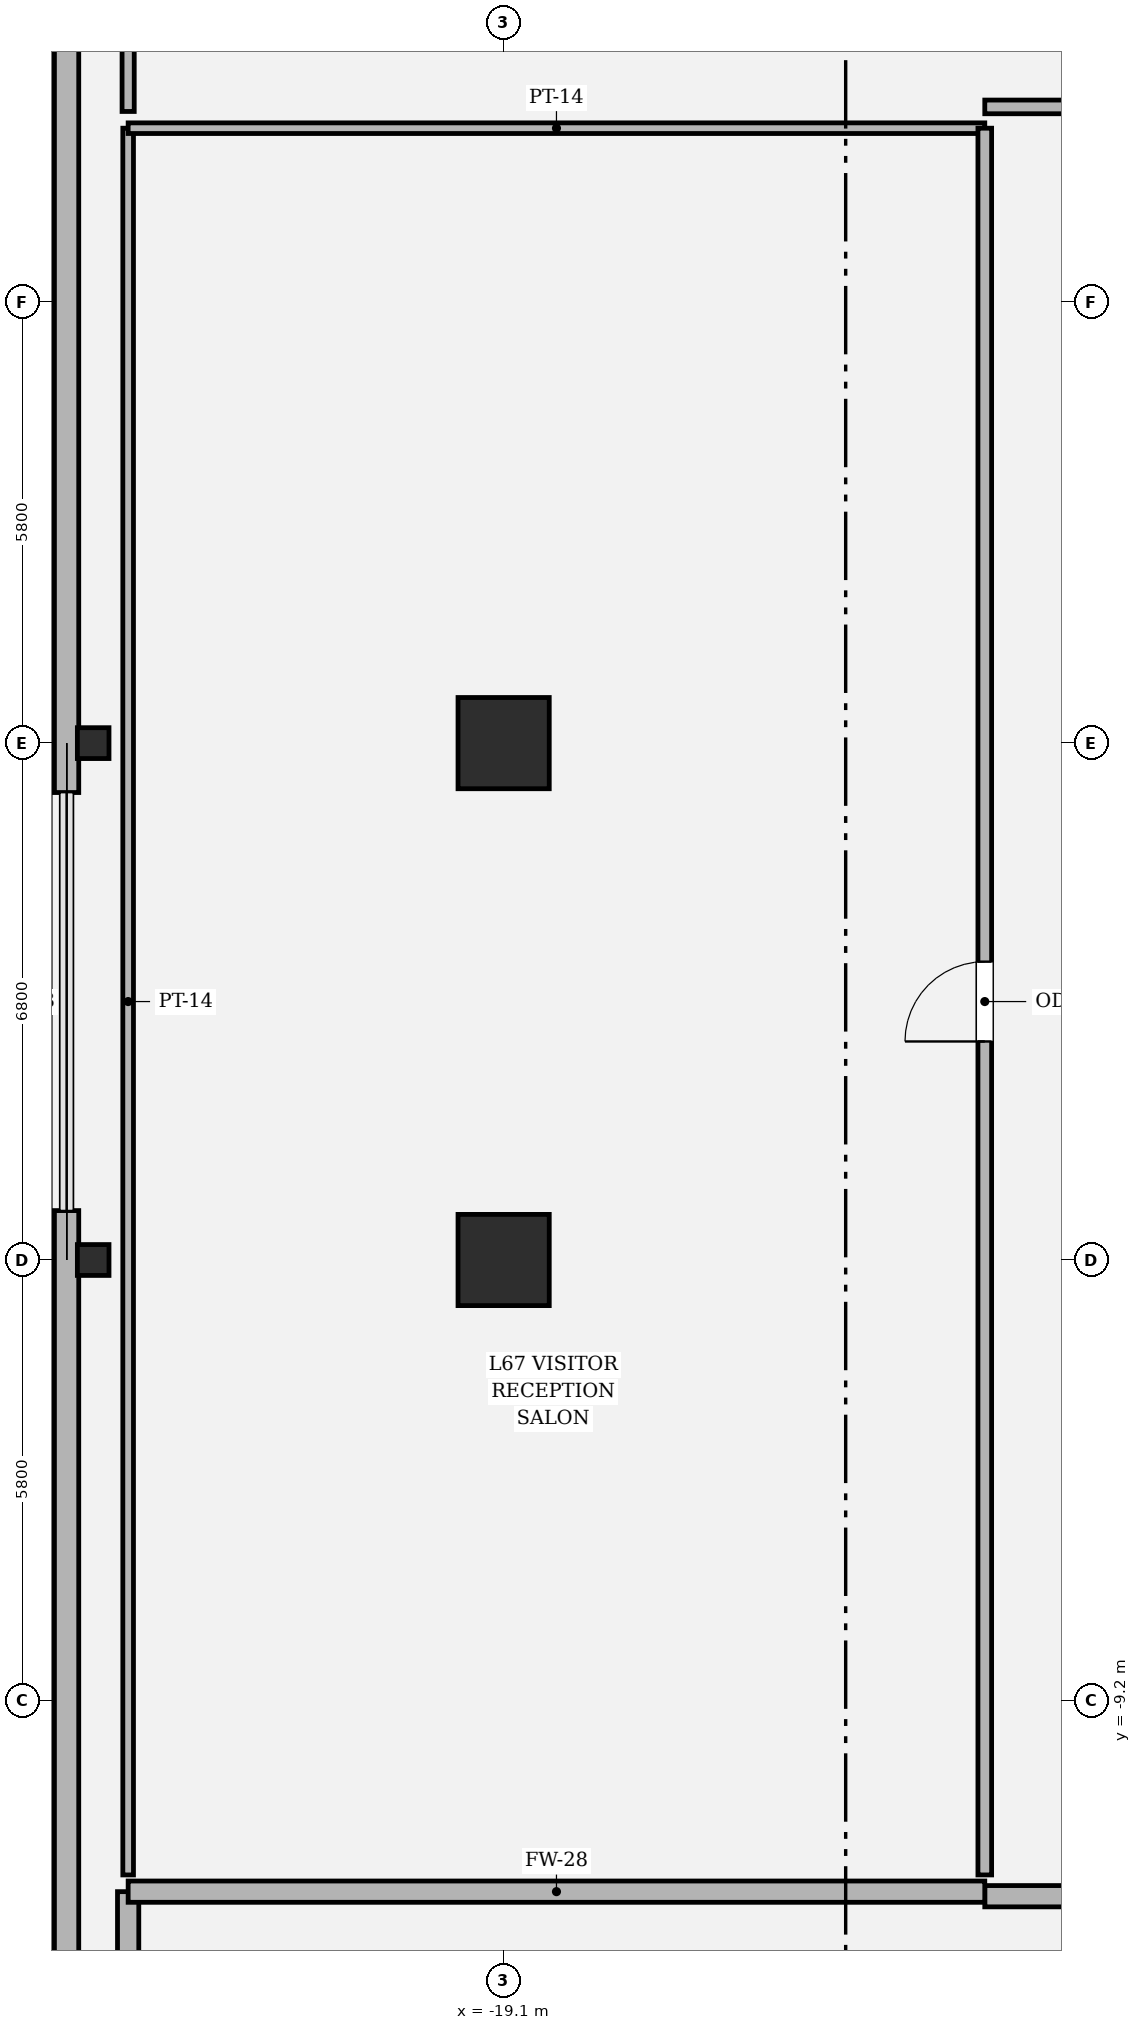
"""IFC4 building model, lengths in metres.
Left out: names, types, materials, properties, quantities, classifications, styles, units other than length and angle.
Written with IfcOpenShell. Run it as: python <this file> out.ifc"""

import sys

from ifc_helpers import new_model, si_unit, direction, frame, frame_2d, origin, origin_2d, place, context, subcontext, project, spatial, rectangle, hollow_rectangle, i_section, extrude, element, fill, save


model = new_model("IFC4")
c1 = context("Model", 3, precision=1e-05, world=origin(), true_north=direction((0.0, 1.0)))
c2 = subcontext(c1, "Body", "Model", "MODEL_VIEW")
j1 = project(units=[si_unit("LENGTHUNIT", "METRE"), si_unit("PLANEANGLEUNIT", "RADIAN")], contexts=[c1])
p1 = place(None, origin())
s1 = spatial("IfcSite", under=j1, at=p1, CompositionType="ELEMENT")
p2 = place(p1, origin())
s2 = spatial("IfcBuilding", under=s1, at=p2, CompositionType="ELEMENT")
p3 = place(p2, frame((0.0, 0.0, 283.8)))
s3 = spatial("IfcBuildingStorey", under=s2, at=p3, CompositionType="ELEMENT", Elevation=283.8)
for number, where, z_axis, x_axis in (
    (1, (-19.1, 3.4, 0.0), (0.0, 0.0, 1.0), (1.0, 0.0, 0.0)),
    (2, (-19.1, -3.4, 0.0), (0.0, 0.0, 1.0), (1.0, 0.0, 0.0)),
):
    element("IfcColumn", number, at=place(p3, frame(where, z_axis=z_axis, x_axis=x_axis)), inside=s3, PredefinedType="COLUMN", context=c2, shape_type="SweptSolid", body=[
        extrude(hollow_rectangle(XDim=1.2, YDim=1.2, WallThickness=0.035, at=origin_2d()), origin(), (0.0, 0.0, 1.0), 4.2),
    ])
for number, where, z_axis, x_axis in (
    (3, (-24.5, -3.4, 0.0), (0.0, 0.0, 1.0), (0.0, 1.0, 0.0)),
    (4, (-24.5, 3.4, 0.0), (0.0, 0.0, 1.0), (0.0, 1.0, 0.0)),
):
    element("IfcColumn", number, at=place(p3, frame(where, z_axis=z_axis, x_axis=x_axis)), inside=s3, PredefinedType="COLUMN", context=c2, shape_type="SweptSolid", body=[
        extrude(i_section(OverallWidth=0.406, OverallDepth=0.416, WebThickness=0.029, FlangeThickness=0.048, FilletRadius=0.018, at=origin_2d()), origin(), (0.0, 0.0, 1.0), 4.198),
    ])
p4 = place(p3, frame((-24.85, 20.237, 0.0), z_axis=(0.0, 0.0, 1.0), x_axis=(0.0, -1.0, 0.0)))
e5 = element("IfcWall", 5, at=p4, inside=s3, PredefinedType="SOLIDWALL", context=c2, shape_type="SweptSolid", body=[
    extrude(rectangle(XDim=17.487, YDim=0.32, at=frame_2d((8.743, 0.0))), origin(), (0.0, 0.0, 1.0), 2.714),
])
p5 = place(p3, frame((-24.85, -2.75, 0.0), z_axis=(0.0, 0.0, 1.0), x_axis=(0.0, -1.0, 0.0)))
e6 = element("IfcWall", 6, at=p5, inside=s3, PredefinedType="SOLIDWALL", context=c2, shape_type="SweptSolid", body=[
    extrude(rectangle(XDim=12.687, YDim=0.32, at=frame_2d((6.344, 0.0))), origin(), (0.0, 0.0, 1.0), 2.714),
])
p6 = place(p3, frame((-12.77, -11.77, 0.0), z_axis=(0.0, 0.0, 1.0), x_axis=(1.0, 0.0, 0.0)))
e7 = element("IfcWall", 7, at=p6, inside=s3, PredefinedType="SOLIDWALL", context=c2, shape_type="SweptSolid", body=[
    extrude(rectangle(XDim=17.718, YDim=0.28, at=frame_2d((8.859, 0.0))), origin(), (0.0, 0.0, 1.0), 3.394),
])
p7 = place(p6, frame((8.009, 0.0, 0.0)))
e8 = element("IfcOpeningElement", 8, at=p7, cuts=e7, PredefinedType="OPENING", context=c2, shape_type="SweptSolid", body=[
    extrude(rectangle(XDim=1.7, YDim=2.3, at=frame_2d((0.85, 1.15))), frame((0.0, 0.15, 0.0), z_axis=(0.0, -1.0, 0.0), x_axis=(1.0, 0.0, 0.0)), (0.0, 0.0, 1.0), 0.3),
])
p8 = place(p3, frame((-24.04, -16.54, 0.0), z_axis=(0.0, 0.0, 1.0), x_axis=(0.0, 1.0, 0.0)))
e9 = element("IfcWall", 9, at=p8, inside=s3, PredefinedType="SOLIDWALL", context=c2, shape_type="SweptSolid", body=[
    extrude(rectangle(XDim=4.83, YDim=0.28, at=frame_2d((2.415, 0.0))), origin(), (0.0, 0.0, 1.0), 4.0),
])
p9 = place(p3, frame((-24.04, -11.71, 0.0), z_axis=(0.0, 0.0, 1.0), x_axis=(1.0, 0.0, 0.0)))
e10 = element("IfcWall", 10, at=p9, inside=s3, PredefinedType="SOLIDWALL", context=c2, shape_type="SweptSolid", body=[
    extrude(rectangle(XDim=11.27, YDim=0.28, at=frame_2d((5.635, 0.0))), origin(), (0.0, 0.0, 1.0), 3.394),
])
p10 = place(p3, frame((-24.04, -11.49, 0.0), z_axis=(0.0, 0.0, 1.0), x_axis=(0.0, 1.0, 0.0)))
e11 = element("IfcWall", 11, at=p10, inside=s3, PredefinedType="PARTITIONING", context=c2, shape_type="SweptSolid", body=[
    extrude(rectangle(XDim=22.98, YDim=0.14, at=frame_2d((11.49, 0.0))), origin(), (0.0, 0.0, 1.0), 2.674),
])
p11 = place(p3, frame((-24.04, 11.49, 0.0), z_axis=(0.0, 0.0, 1.0), x_axis=(1.0, 0.0, 0.0)))
e12 = element("IfcWall", 12, at=p11, inside=s3, PredefinedType="PARTITIONING", context=c2, shape_type="SweptSolid", body=[
    extrude(rectangle(XDim=11.27, YDim=0.14, at=frame_2d((5.635, 0.0))), origin(), (0.0, 0.0, 1.0), 3.394),
])
p12 = place(p3, frame((-12.77, 11.49, 0.0), z_axis=(0.0, 0.0, 1.0), x_axis=(0.0, -1.0, 0.0)))
e13 = element("IfcWall", 13, at=p12, inside=s3, PredefinedType="PARTITIONING", context=c2, shape_type="SweptSolid", body=[
    extrude(rectangle(XDim=22.98, YDim=0.18, at=frame_2d((11.49, 0.0))), origin(), (0.0, 0.0, 1.0), 3.394),
])
p13 = place(p12, frame((10.965, 0.0, 0.0)))
e14 = element("IfcOpeningElement", 14, at=p13, cuts=e13, PredefinedType="OPENING", context=c2, shape_type="SweptSolid", body=[
    extrude(rectangle(XDim=1.05, YDim=2.2, at=frame_2d((0.525, 1.1))), frame((0.0, 0.1, 0.0), z_axis=(0.0, -1.0, 0.0), x_axis=(1.0, 0.0, 0.0)), (0.0, 0.0, 1.0), 0.2),
])
p14 = place(p3, frame((5.874, 11.77, 0.0), z_axis=(0.0, 0.0, 1.0), x_axis=(-1.0, 0.0, 0.0)))
e15 = element("IfcWall", 15, at=p14, inside=s3, PredefinedType="PARTITIONING", context=c2, shape_type="SweptSolid", body=[
    extrude(rectangle(XDim=18.644, YDim=0.18, at=frame_2d((9.322, 0.0))), origin(), (0.0, 0.0, 1.0), 3.394),
])
p15 = place(p14, frame((8.797, 0.0, 0.0)))
e16 = element("IfcOpeningElement", 16, at=p15, cuts=e15, PredefinedType="OPENING", context=c2, shape_type="SweptSolid", body=[
    extrude(rectangle(XDim=1.05, YDim=2.2, at=frame_2d((0.525, 1.1))), frame((0.0, 0.1, 0.0), z_axis=(0.0, -1.0, 0.0), x_axis=(1.0, 0.0, 0.0)), (0.0, 0.0, 1.0), 0.2),
])
p16 = place(p3, frame((-24.04, 11.71, 0.0), z_axis=(0.0, 0.0, 1.0), x_axis=(0.0, 1.0, 0.0)))
e17 = element("IfcWall", 17, at=p16, inside=s3, PredefinedType="PARTITIONING", context=c2, shape_type="SweptSolid", body=[
    extrude(rectangle(XDim=10.438, YDim=0.16, at=frame_2d((5.219, 0.0))), origin(), (0.0, 0.0, 1.0), 2.674),
])
p17 = place(p13, origin())
e18 = element("IfcDoor", 18, at=p17, inside=s3, OperationType="SINGLE_SWING_RIGHT", PredefinedType="DOOR", context=c2, shape_type="SweptSolid", body=[
    extrude(rectangle(XDim=1.05, YDim=2.2, at=frame_2d((0.525, 1.1))), frame((0.0, 0.025, 0.0), z_axis=(0.0, -1.0, 0.0), x_axis=(1.0, 0.0, 0.0)), (0.0, 0.0, 1.0), 0.05),
])
fill(e14, e18)
save(model, sys.argv[1])
